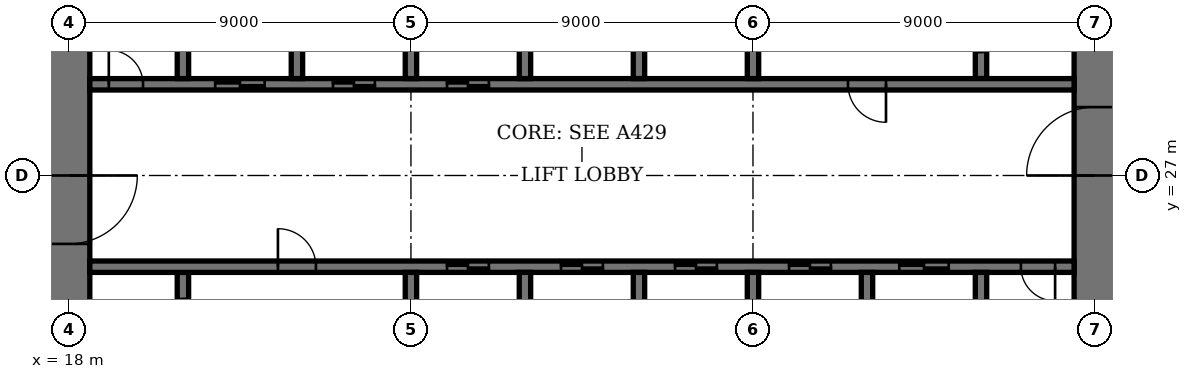
"""IFC4 building model, lengths in metres.
Left out: names, types, materials, properties, quantities, classifications, styles, units other than length and angle.
Written with IfcOpenShell. Run it as: python <this file> out.ifc"""

import sys

from ifc_helpers import new_model, si_unit, direction, frame, frame_2d, origin, place, context, subcontext, project, spatial, rectangle, extrude, element, fill, save


model = new_model("IFC4")
c1 = context("Model", 3, precision=1e-05, world=origin(), true_north=direction((0.0, 1.0)))
c2 = subcontext(c1, "Body", "Model", "MODEL_VIEW")
j1 = project(units=[si_unit("LENGTHUNIT", "METRE"), si_unit("PLANEANGLEUNIT", "RADIAN")], contexts=[c1])
p1 = place(None, origin())
s1 = spatial("IfcSite", under=j1, at=p1, CompositionType="ELEMENT")
p2 = place(p1, origin())
s2 = spatial("IfcBuilding", under=s1, at=p2, CompositionType="ELEMENT")
p3 = place(p2, frame((0.0, 0.0, 157.2)))
s3 = spatial("IfcBuildingStorey", under=s2, at=p3, CompositionType="ELEMENT", Elevation=157.2)
p4 = place(p3, frame((18.0, 35.45, 0.0), z_axis=(0.0, 0.0, 1.0), x_axis=(0.0, -1.0, 0.0)))
e1 = element("IfcWall", 1, at=p4, inside=s3, PredefinedType="SHEAR", context=c2, shape_type="SweptSolid", body=[
    extrude(rectangle(XDim=16.9, YDim=1.1, at=frame_2d((8.45, 0.0))), origin(), (0.0, 0.0, 1.0), 5.0),
])
p5 = place(p4, frame((8.45, 0.0, 0.0)))
e2 = element("IfcOpeningElement", 2, at=p5, cuts=e1, PredefinedType="OPENING", context=c2, shape_type="SweptSolid", body=[
    extrude(rectangle(XDim=1.8, YDim=2.4, at=frame_2d((0.9, 1.2))), frame((0.0, 0.56, 0.0), z_axis=(0.0, -1.0, 0.0), x_axis=(1.0, 0.0, 0.0)), (0.0, 0.0, 1.0), 1.12),
])
p6 = place(p3, frame((45.0, 18.55, 0.0), z_axis=(0.0, 0.0, 1.0), x_axis=(0.0, 1.0, 0.0)))
e3 = element("IfcWall", 3, at=p6, inside=s3, PredefinedType="SHEAR", context=c2, shape_type="SweptSolid", body=[
    extrude(rectangle(XDim=16.9, YDim=1.1, at=frame_2d((8.45, 0.0))), origin(), (0.0, 0.0, 1.0), 5.0),
])
p7 = place(p6, frame((8.45, 0.0, 0.0)))
e4 = element("IfcOpeningElement", 4, at=p7, cuts=e3, PredefinedType="OPENING", context=c2, shape_type="SweptSolid", body=[
    extrude(rectangle(XDim=1.8, YDim=2.4, at=frame_2d((0.9, 1.2))), frame((0.0, 0.56, 0.0), z_axis=(0.0, -1.0, 0.0), x_axis=(1.0, 0.0, 0.0)), (0.0, 0.0, 1.0), 1.12),
])
p8 = place(p3, frame((21.0, 21.95, 0.0), z_axis=(0.0, 0.0, 1.0), x_axis=(0.0, 1.0, 0.0)))
e5 = element("IfcWall", 5, at=p8, inside=s3, PredefinedType="SHEAR", context=c2, shape_type="SweptSolid", body=[
    extrude(rectangle(XDim=2.5, YDim=0.3, at=frame_2d((1.25, 0.0))), origin(), (0.0, 0.0, 1.0), 5.0),
])
p9 = place(p8, frame((0.7, 0.0, 0.0)))
e6 = element("IfcOpeningElement", 6, at=p9, cuts=e5, PredefinedType="OPENING", context=c2, shape_type="SweptSolid", body=[
    extrude(rectangle(XDim=1.1, YDim=2.4, at=frame_2d((0.55, 1.2))), frame((0.0, 0.16, 0.0), z_axis=(0.0, -1.0, 0.0), x_axis=(1.0, 0.0, 0.0)), (0.0, 0.0, 1.0), 0.32),
])
p10 = place(p3, frame((42.0, 29.55, 0.0), z_axis=(0.0, 0.0, 1.0), x_axis=(0.0, 1.0, 0.0)))
e7 = element("IfcWall", 7, at=p10, inside=s3, PredefinedType="SHEAR", context=c2, shape_type="SweptSolid", body=[
    extrude(rectangle(XDim=2.5, YDim=0.3, at=frame_2d((1.25, 0.0))), origin(), (0.0, 0.0, 1.0), 5.0),
])
p11 = place(p10, frame((0.7, 0.0, 0.0)))
e8 = element("IfcOpeningElement", 8, at=p11, cuts=e7, PredefinedType="OPENING", context=c2, shape_type="SweptSolid", body=[
    extrude(rectangle(XDim=1.1, YDim=2.4, at=frame_2d((0.55, 1.2))), frame((0.0, 0.16, 0.0), z_axis=(0.0, -1.0, 0.0), x_axis=(1.0, 0.0, 0.0)), (0.0, 0.0, 1.0), 0.32),
])
p12 = place(p3, frame((18.55, 24.6, 0.0), z_axis=(0.0, 0.0, 1.0), x_axis=(1.0, 0.0, 0.0)))
e9 = element("IfcWall", 9, at=p12, inside=s3, PredefinedType="SHEAR", context=c2, shape_type="SweptSolid", body=[
    extrude(rectangle(XDim=25.9, YDim=0.3, at=frame_2d((12.95, 0.0))), origin(), (0.0, 0.0, 1.0), 5.0),
])
p13 = place(p12, frame((4.95, 0.0, 0.0)))
e10 = element("IfcOpeningElement", 10, at=p13, cuts=e9, PredefinedType="OPENING", context=c2, shape_type="SweptSolid", body=[
    extrude(rectangle(XDim=1.0, YDim=2.4, at=frame_2d((0.5, 1.2))), frame((0.0, 0.16, 0.0), z_axis=(0.0, -1.0, 0.0), x_axis=(1.0, 0.0, 0.0)), (0.0, 0.0, 1.0), 0.32),
])
p14 = place(p12, frame((24.5, 0.0, 0.0)))
e11 = element("IfcOpeningElement", 11, at=p14, cuts=e9, PredefinedType="OPENING", context=c2, shape_type="SweptSolid", body=[
    extrude(rectangle(XDim=0.9, YDim=2.1, at=frame_2d((0.45, 1.05))), frame((0.0, 0.16, 0.0), z_axis=(0.0, -1.0, 0.0), x_axis=(1.0, 0.0, 0.0)), (0.0, 0.0, 1.0), 0.32),
])
p15 = place(p12, frame((9.4, 0.0, 0.0)))
e12 = element("IfcOpeningElement", 12, at=p15, cuts=e9, PredefinedType="OPENING", context=c2, shape_type="SweptSolid", body=[
    extrude(rectangle(XDim=1.1, YDim=2.4, at=frame_2d((0.55, 1.2))), frame((0.0, 0.16, 0.0), z_axis=(0.0, -1.0, 0.0), x_axis=(1.0, 0.0, 0.0)), (0.0, 0.0, 1.0), 0.32),
])
p16 = place(p12, frame((12.4, 0.0, 0.0)))
e13 = element("IfcOpeningElement", 13, at=p16, cuts=e9, PredefinedType="OPENING", context=c2, shape_type="SweptSolid", body=[
    extrude(rectangle(XDim=1.1, YDim=2.4, at=frame_2d((0.55, 1.2))), frame((0.0, 0.16, 0.0), z_axis=(0.0, -1.0, 0.0), x_axis=(1.0, 0.0, 0.0)), (0.0, 0.0, 1.0), 0.32),
])
p17 = place(p12, frame((15.4, 0.0, 0.0)))
e14 = element("IfcOpeningElement", 14, at=p17, cuts=e9, PredefinedType="OPENING", context=c2, shape_type="SweptSolid", body=[
    extrude(rectangle(XDim=1.1, YDim=2.4, at=frame_2d((0.55, 1.2))), frame((0.0, 0.16, 0.0), z_axis=(0.0, -1.0, 0.0), x_axis=(1.0, 0.0, 0.0)), (0.0, 0.0, 1.0), 0.32),
])
p18 = place(p12, frame((18.4, 0.0, 0.0)))
e15 = element("IfcOpeningElement", 15, at=p18, cuts=e9, PredefinedType="OPENING", context=c2, shape_type="SweptSolid", body=[
    extrude(rectangle(XDim=1.1, YDim=2.4, at=frame_2d((0.55, 1.2))), frame((0.0, 0.16, 0.0), z_axis=(0.0, -1.0, 0.0), x_axis=(1.0, 0.0, 0.0)), (0.0, 0.0, 1.0), 0.32),
])
p19 = place(p12, frame((21.3, 0.0, 0.0)))
e16 = element("IfcOpeningElement", 16, at=p19, cuts=e9, PredefinedType="OPENING", context=c2, shape_type="SweptSolid", body=[
    extrude(rectangle(XDim=1.3, YDim=2.4, at=frame_2d((0.65, 1.2))), frame((0.0, 0.16, 0.0), z_axis=(0.0, -1.0, 0.0), x_axis=(1.0, 0.0, 0.0)), (0.0, 0.0, 1.0), 0.32),
])
p20 = place(p3, frame((18.55, 29.4, 0.0), z_axis=(0.0, 0.0, 1.0), x_axis=(1.0, 0.0, 0.0)))
e17 = element("IfcWall", 17, at=p20, inside=s3, PredefinedType="SHEAR", context=c2, shape_type="SweptSolid", body=[
    extrude(rectangle(XDim=25.9, YDim=0.3, at=frame_2d((12.95, 0.0))), origin(), (0.0, 0.0, 1.0), 5.0),
])
p21 = place(p20, frame((19.95, 0.0, 0.0)))
e18 = element("IfcOpeningElement", 18, at=p21, cuts=e17, PredefinedType="OPENING", context=c2, shape_type="SweptSolid", body=[
    extrude(rectangle(XDim=1.0, YDim=2.4, at=frame_2d((0.5, 1.2))), frame((0.0, 0.16, 0.0), z_axis=(0.0, -1.0, 0.0), x_axis=(1.0, 0.0, 0.0)), (0.0, 0.0, 1.0), 0.32),
])
p22 = place(p20, frame((0.5, 0.0, 0.0)))
e19 = element("IfcOpeningElement", 19, at=p22, cuts=e17, PredefinedType="OPENING", context=c2, shape_type="SweptSolid", body=[
    extrude(rectangle(XDim=0.9, YDim=2.1, at=frame_2d((0.45, 1.05))), frame((0.0, 0.16, 0.0), z_axis=(0.0, -1.0, 0.0), x_axis=(1.0, 0.0, 0.0)), (0.0, 0.0, 1.0), 0.32),
])
p23 = place(p20, frame((9.4, 0.0, 0.0)))
e20 = element("IfcOpeningElement", 20, at=p23, cuts=e17, PredefinedType="OPENING", context=c2, shape_type="SweptSolid", body=[
    extrude(rectangle(XDim=1.1, YDim=2.4, at=frame_2d((0.55, 1.2))), frame((0.0, 0.16, 0.0), z_axis=(0.0, -1.0, 0.0), x_axis=(1.0, 0.0, 0.0)), (0.0, 0.0, 1.0), 0.32),
])
p24 = place(p20, frame((6.4, 0.0, 0.0)))
e21 = element("IfcOpeningElement", 21, at=p24, cuts=e17, PredefinedType="OPENING", context=c2, shape_type="SweptSolid", body=[
    extrude(rectangle(XDim=1.1, YDim=2.4, at=frame_2d((0.55, 1.2))), frame((0.0, 0.16, 0.0), z_axis=(0.0, -1.0, 0.0), x_axis=(1.0, 0.0, 0.0)), (0.0, 0.0, 1.0), 0.32),
])
p25 = place(p20, frame((3.3, 0.0, 0.0)))
e22 = element("IfcOpeningElement", 22, at=p25, cuts=e17, PredefinedType="OPENING", context=c2, shape_type="SweptSolid", body=[
    extrude(rectangle(XDim=1.3, YDim=2.4, at=frame_2d((0.65, 1.2))), frame((0.0, 0.16, 0.0), z_axis=(0.0, -1.0, 0.0), x_axis=(1.0, 0.0, 0.0)), (0.0, 0.0, 1.0), 0.32),
])
for number, where, z_axis, x_axis in (
    (23, (30.0, 21.75, 0.0), (0.0, 0.0, 1.0), (0.0, 1.0, 0.0)),
    (24, (33.0, 29.55, 0.0), (0.0, 0.0, 1.0), (0.0, 1.0, 0.0)),
    (25, (33.0, 21.75, 0.0), (0.0, 0.0, 1.0), (0.0, 1.0, 0.0)),
    (26, (30.0, 29.55, 0.0), (0.0, 0.0, 1.0), (0.0, 1.0, 0.0)),
    (27, (36.0, 21.75, 0.0), (0.0, 0.0, 1.0), (0.0, 1.0, 0.0)),
    (28, (27.0, 29.55, 0.0), (0.0, 0.0, 1.0), (0.0, 1.0, 0.0)),
):
    element("IfcWall", number, at=place(p3, frame(where, z_axis=z_axis, x_axis=x_axis)), inside=s3, PredefinedType="SHEAR", context=c2, shape_type="SweptSolid", body=[
        extrude(rectangle(XDim=2.7, YDim=0.3, at=frame_2d((1.35, 0.0))), origin(), (0.0, 0.0, 1.0), 5.0),
    ])
for number, where, z_axis, x_axis in (
    (29, (39.0, 18.55, 0.0), (0.0, 0.0, 1.0), (0.0, 1.0, 0.0)),
    (30, (24.0, 29.55, 0.0), (0.0, 0.0, 1.0), (0.0, 1.0, 0.0)),
):
    element("IfcWall", number, at=place(p3, frame(where, z_axis=z_axis, x_axis=x_axis)), inside=s3, PredefinedType="SHEAR", context=c2, shape_type="SweptSolid", body=[
        extrude(rectangle(XDim=5.9, YDim=0.3, at=frame_2d((2.95, 0.0))), origin(), (0.0, 0.0, 1.0), 5.0),
    ])
for number, where, z_axis, x_axis in (
    (31, (42.0, 21.75, 0.0), (0.0, 0.0, 1.0), (0.0, 1.0, 0.0)),
    (32, (21.0, 29.55, 0.0), (0.0, 0.0, 1.0), (0.0, 1.0, 0.0)),
):
    element("IfcWall", number, at=place(p3, frame(where, z_axis=z_axis, x_axis=x_axis)), inside=s3, PredefinedType="SHEAR", context=c2, shape_type="SweptSolid", body=[
        extrude(rectangle(XDim=2.7, YDim=0.3, at=frame_2d((1.35, 0.0))), origin(), (0.0, 0.0, 1.0), 5.0),
    ])
for number, where, z_axis, x_axis in (
    (33, (27.0, 21.6, 0.0), (0.0, 0.0, 1.0), (0.0, 1.0, 0.0)),
    (34, (36.0, 29.55, 0.0), (0.0, 0.0, 1.0), (0.0, 1.0, 0.0)),
):
    element("IfcWall", number, at=place(p3, frame(where, z_axis=z_axis, x_axis=x_axis)), inside=s3, PredefinedType="SHEAR", context=c2, shape_type="SweptSolid", body=[
        extrude(rectangle(XDim=2.85, YDim=0.3, at=frame_2d((1.425, 0.0))), origin(), (0.0, 0.0, 1.0), 5.0),
    ])
p26 = place(p5, origin())
e35 = element("IfcDoor", 35, at=p26, inside=s3, OperationType="DOUBLE_DOOR_DOUBLE_SWING", PredefinedType="DOOR", context=c2, shape_type="SweptSolid", body=[
    extrude(rectangle(XDim=1.8, YDim=2.4, at=frame_2d((0.9, 1.2))), frame((0.0, 0.03, 0.0), z_axis=(0.0, -1.0, 0.0), x_axis=(1.0, 0.0, 0.0)), (0.0, 0.0, 1.0), 0.06),
    extrude(rectangle(XDim=0.04, YDim=2.4, at=frame_2d((0.02, 1.2))), frame((0.0, 0.55, 0.0), z_axis=(0.0, -1.0, 0.0), x_axis=(1.0, 0.0, 0.0)), (0.0, 0.0, 1.0), 1.1),
    extrude(rectangle(XDim=0.04, YDim=2.4, at=frame_2d((1.78, 1.2))), frame((0.0, 0.55, 0.0), z_axis=(0.0, -1.0, 0.0), x_axis=(1.0, 0.0, 0.0)), (0.0, 0.0, 1.0), 1.1),
    extrude(rectangle(XDim=1.8, YDim=0.04, at=frame_2d((0.9, 2.38))), frame((0.0, 0.55, 0.0), z_axis=(0.0, -1.0, 0.0), x_axis=(1.0, 0.0, 0.0)), (0.0, 0.0, 1.0), 1.1),
])
fill(e2, e35)
p27 = place(p7, origin())
e36 = element("IfcDoor", 36, at=p27, inside=s3, OperationType="DOUBLE_DOOR_DOUBLE_SWING", PredefinedType="DOOR", context=c2, shape_type="SweptSolid", body=[
    extrude(rectangle(XDim=1.8, YDim=2.4, at=frame_2d((0.9, 1.2))), frame((0.0, 0.03, 0.0), z_axis=(0.0, -1.0, 0.0), x_axis=(1.0, 0.0, 0.0)), (0.0, 0.0, 1.0), 0.06),
    extrude(rectangle(XDim=0.04, YDim=2.4, at=frame_2d((0.02, 1.2))), frame((0.0, 0.55, 0.0), z_axis=(0.0, -1.0, 0.0), x_axis=(1.0, 0.0, 0.0)), (0.0, 0.0, 1.0), 1.1),
    extrude(rectangle(XDim=0.04, YDim=2.4, at=frame_2d((1.78, 1.2))), frame((0.0, 0.55, 0.0), z_axis=(0.0, -1.0, 0.0), x_axis=(1.0, 0.0, 0.0)), (0.0, 0.0, 1.0), 1.1),
    extrude(rectangle(XDim=1.8, YDim=0.04, at=frame_2d((0.9, 2.38))), frame((0.0, 0.55, 0.0), z_axis=(0.0, -1.0, 0.0), x_axis=(1.0, 0.0, 0.0)), (0.0, 0.0, 1.0), 1.1),
])
fill(e4, e36)
p28 = place(p13, origin())
e37 = element("IfcDoor", 37, at=p28, inside=s3, OperationType="SINGLE_SWING_RIGHT", PredefinedType="DOOR", context=c2, shape_type="SweptSolid", body=[
    extrude(rectangle(XDim=1.0, YDim=2.4, at=frame_2d((0.5, 1.2))), frame((0.0, 0.03, 0.0), z_axis=(0.0, -1.0, 0.0), x_axis=(1.0, 0.0, 0.0)), (0.0, 0.0, 1.0), 0.06),
])
fill(e10, e37)
p29 = place(p21, origin())
e38 = element("IfcDoor", 38, at=p29, inside=s3, OperationType="SINGLE_SWING_RIGHT", PredefinedType="DOOR", context=c2, shape_type="SweptSolid", body=[
    extrude(rectangle(XDim=1.0, YDim=2.4, at=frame_2d((0.5, 1.2))), frame((0.0, 0.03, 0.0), z_axis=(0.0, -1.0, 0.0), x_axis=(1.0, 0.0, 0.0)), (0.0, 0.0, 1.0), 0.06),
])
fill(e18, e38)
p30 = place(p14, origin())
e39 = element("IfcDoor", 39, at=p30, inside=s3, OperationType="SINGLE_SWING_RIGHT", PredefinedType="DOOR", context=c2, shape_type="SweptSolid", body=[
    extrude(rectangle(XDim=0.9, YDim=2.1, at=frame_2d((0.45, 1.05))), frame((0.0, 0.03, 0.0), z_axis=(0.0, -1.0, 0.0), x_axis=(1.0, 0.0, 0.0)), (0.0, 0.0, 1.0), 0.06),
])
fill(e11, e39)
p31 = place(p22, origin())
e40 = element("IfcDoor", 40, at=p31, inside=s3, OperationType="SINGLE_SWING_RIGHT", PredefinedType="DOOR", context=c2, shape_type="SweptSolid", body=[
    extrude(rectangle(XDim=0.9, YDim=2.1, at=frame_2d((0.45, 1.05))), frame((0.0, 0.03, 0.0), z_axis=(0.0, -1.0, 0.0), x_axis=(1.0, 0.0, 0.0)), (0.0, 0.0, 1.0), 0.06),
])
fill(e19, e40)
p32 = place(p15, origin())
e41 = element("IfcDoor", 41, at=p32, inside=s3, OperationType="DOUBLE_DOOR_SLIDING", PredefinedType="DOOR", context=c2, shape_type="SweptSolid", body=[
    extrude(rectangle(XDim=1.1, YDim=2.4, at=frame_2d((0.55, 1.2))), frame((0.0, 0.02, 0.0), z_axis=(0.0, -1.0, 0.0), x_axis=(1.0, 0.0, 0.0)), (0.0, 0.0, 1.0), 0.04),
])
fill(e12, e41)
p33 = place(p16, origin())
e42 = element("IfcDoor", 42, at=p33, inside=s3, OperationType="DOUBLE_DOOR_SLIDING", PredefinedType="DOOR", context=c2, shape_type="SweptSolid", body=[
    extrude(rectangle(XDim=1.1, YDim=2.4, at=frame_2d((0.55, 1.2))), frame((0.0, 0.02, 0.0), z_axis=(0.0, -1.0, 0.0), x_axis=(1.0, 0.0, 0.0)), (0.0, 0.0, 1.0), 0.04),
])
fill(e13, e42)
p34 = place(p17, origin())
e43 = element("IfcDoor", 43, at=p34, inside=s3, OperationType="DOUBLE_DOOR_SLIDING", PredefinedType="DOOR", context=c2, shape_type="SweptSolid", body=[
    extrude(rectangle(XDim=1.1, YDim=2.4, at=frame_2d((0.55, 1.2))), frame((0.0, 0.02, 0.0), z_axis=(0.0, -1.0, 0.0), x_axis=(1.0, 0.0, 0.0)), (0.0, 0.0, 1.0), 0.04),
])
fill(e14, e43)
p35 = place(p18, origin())
e44 = element("IfcDoor", 44, at=p35, inside=s3, OperationType="DOUBLE_DOOR_SLIDING", PredefinedType="DOOR", context=c2, shape_type="SweptSolid", body=[
    extrude(rectangle(XDim=1.1, YDim=2.4, at=frame_2d((0.55, 1.2))), frame((0.0, 0.02, 0.0), z_axis=(0.0, -1.0, 0.0), x_axis=(1.0, 0.0, 0.0)), (0.0, 0.0, 1.0), 0.04),
])
fill(e15, e44)
p36 = place(p23, origin())
e45 = element("IfcDoor", 45, at=p36, inside=s3, OperationType="DOUBLE_DOOR_SLIDING", PredefinedType="DOOR", context=c2, shape_type="SweptSolid", body=[
    extrude(rectangle(XDim=1.1, YDim=2.4, at=frame_2d((0.55, 1.2))), frame((0.0, 0.02, 0.0), z_axis=(0.0, -1.0, 0.0), x_axis=(1.0, 0.0, 0.0)), (0.0, 0.0, 1.0), 0.04),
])
fill(e20, e45)
p37 = place(p24, origin())
e46 = element("IfcDoor", 46, at=p37, inside=s3, OperationType="DOUBLE_DOOR_SLIDING", PredefinedType="DOOR", context=c2, shape_type="SweptSolid", body=[
    extrude(rectangle(XDim=1.1, YDim=2.4, at=frame_2d((0.55, 1.2))), frame((0.0, 0.02, 0.0), z_axis=(0.0, -1.0, 0.0), x_axis=(1.0, 0.0, 0.0)), (0.0, 0.0, 1.0), 0.04),
])
fill(e21, e46)
p38 = place(p19, origin())
e47 = element("IfcDoor", 47, at=p38, inside=s3, OperationType="DOUBLE_DOOR_SLIDING", PredefinedType="DOOR", context=c2, shape_type="SweptSolid", body=[
    extrude(rectangle(XDim=1.3, YDim=2.4, at=frame_2d((0.65, 1.2))), frame((0.0, 0.02, 0.0), z_axis=(0.0, -1.0, 0.0), x_axis=(1.0, 0.0, 0.0)), (0.0, 0.0, 1.0), 0.04),
])
fill(e16, e47)
p39 = place(p25, origin())
e48 = element("IfcDoor", 48, at=p39, inside=s3, OperationType="DOUBLE_DOOR_SLIDING", PredefinedType="DOOR", context=c2, shape_type="SweptSolid", body=[
    extrude(rectangle(XDim=1.3, YDim=2.4, at=frame_2d((0.65, 1.2))), frame((0.0, 0.02, 0.0), z_axis=(0.0, -1.0, 0.0), x_axis=(1.0, 0.0, 0.0)), (0.0, 0.0, 1.0), 0.04),
])
fill(e22, e48)
save(model, sys.argv[1])
